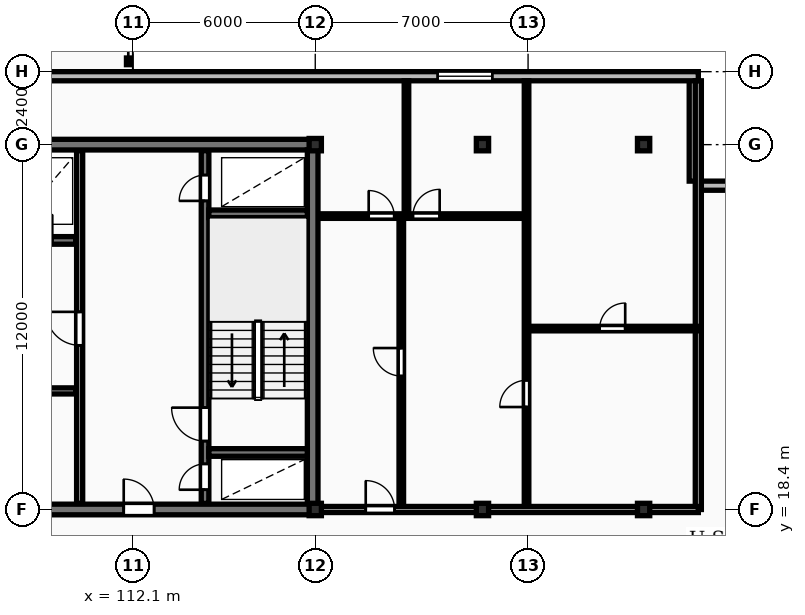
"""IFC4 building model, lengths in metres.
Left out: names, types, materials, properties, quantities, classifications, styles, units other than length and angle.
Written with IfcOpenShell. Run it as: python <this file> out.ifc"""

import sys

from ifc_helpers import new_model, si_unit, direction, frame, frame_2d, origin, origin_2d, place, context, subcontext, project, spatial, rectangle, i_section, extrude, element, fill, save


model = new_model("IFC4")
c1 = context("Model", 3, precision=1e-05, world=origin(), true_north=direction((0.0, 1.0)))
c2 = subcontext(c1, "Body", "Model", "MODEL_VIEW")
j1 = project(units=[si_unit("LENGTHUNIT", "METRE"), si_unit("PLANEANGLEUNIT", "RADIAN")], contexts=[c1])
p1 = place(None, origin())
s1 = spatial("IfcSite", under=j1, at=p1, CompositionType="ELEMENT")
p2 = place(p1, origin())
s2 = spatial("IfcBuilding", under=s1, at=p2, CompositionType="ELEMENT")
p3 = place(p2, frame((0.0, 0.0, 150.1)))
s3 = spatial("IfcBuildingStorey", under=s2, at=p3, CompositionType="ELEMENT", Elevation=150.1)
for number, where, z_axis, x_axis in (
    (1, (118.1, 18.4, 0.0), (0.0, 0.0, 1.0), (1.0, 0.0, 0.0)),
    (2, (118.1, 30.4, 0.0), (0.0, 0.0, 1.0), (1.0, 0.0, 0.0)),
    (3, (123.6, 18.4, 0.0), (0.0, 0.0, 1.0), (1.0, 0.0, 0.0)),
    (4, (123.6, 30.4, 0.0), (0.0, 0.0, 1.0), (1.0, 0.0, 0.0)),
    (5, (128.9, 18.4, 0.0), (0.0, 0.0, 1.0), (1.0, 0.0, 0.0)),
    (6, (128.9, 30.4, 0.0), (0.0, 0.0, 1.0), (1.0, 0.0, 0.0)),
):
    element("IfcColumn", number, at=place(p3, frame(where, z_axis=z_axis, x_axis=x_axis)), inside=s3, PredefinedType="COLUMN", context=c2, shape_type="SweptSolid", body=[
        extrude(i_section(OverallWidth=0.403, OverallDepth=0.406, WebThickness=0.027, FlangeThickness=0.043, FilletRadius=0.015, at=origin_2d()), origin(), (0.0, 0.0, 1.0), 3.6),
    ])
for number, where, z_axis, x_axis in (
    (7, (134.3, 29.05, 0.0), (0.0, 0.0, 1.0), (-1.0, 0.0, 0.0)),
    (8, (130.55, 29.2, 0.0), (0.0, 0.0, 1.0), (0.0, 1.0, 0.0)),
):
    element("IfcWall", number, at=place(p3, frame(where, z_axis=z_axis, x_axis=x_axis)), inside=s3, PredefinedType="STANDARD", context=c2, shape_type="SweptSolid", body=[
        extrude(rectangle(XDim=3.6, YDim=0.3, at=frame_2d((1.8, 0.0))), origin(), (0.0, 0.0, 1.0), 3.31),
    ])
p4 = place(p3, frame((130.7, 32.65, 0.0), z_axis=(0.0, 0.0, 1.0), x_axis=(-1.0, 0.0, 0.0)))
e9 = element("IfcWall", 9, at=p4, inside=s3, PredefinedType="STANDARD", context=c2, shape_type="SweptSolid", body=[
    extrude(rectangle(XDim=58.0, YDim=0.3, at=frame_2d((29.0, 0.0))), origin(), (0.0, 0.0, 1.0), 3.31),
])
p5 = place(p4, frame((50.125, 0.0, 0.85)))
e10 = element("IfcOpeningElement", 10, at=p5, cuts=e9, PredefinedType="OPENING", context=c2, shape_type="SweptSolid", body=[
    extrude(rectangle(XDim=1.8, YDim=1.8, at=frame_2d((0.9, 0.9))), frame((0.0, 0.16, 0.0), z_axis=(0.0, -1.0, 0.0), x_axis=(1.0, 0.0, 0.0)), (0.0, 0.0, 1.0), 0.32),
])
p6 = place(p4, frame((6.775, 0.0, 0.85)))
e11 = element("IfcOpeningElement", 11, at=p6, cuts=e9, PredefinedType="OPENING", context=c2, shape_type="SweptSolid", body=[
    extrude(rectangle(XDim=1.8, YDim=1.8, at=frame_2d((0.9, 0.9))), frame((0.0, 0.16, 0.0), z_axis=(0.0, -1.0, 0.0), x_axis=(1.0, 0.0, 0.0)), (0.0, 0.0, 1.0), 0.32),
])
p7 = place(p4, frame((38.0, 0.0, 0.0)))
e12 = element("IfcOpeningElement", 12, at=p7, cuts=e9, PredefinedType="OPENING", context=c2, shape_type="SweptSolid", body=[
    extrude(rectangle(XDim=1.1, YDim=2.1, at=frame_2d((0.55, 1.05))), frame((0.0, 0.16, 0.0), z_axis=(0.0, -1.0, 0.0), x_axis=(1.0, 0.0, 0.0)), (0.0, 0.0, 1.0), 0.32),
])
p8 = place(p3, frame((81.925, 30.4, 0.0), z_axis=(0.0, 0.0, 1.0), x_axis=(1.0, 0.0, 0.0)))
e13 = element("IfcWall", 13, at=p8, inside=s3, PredefinedType="SHEAR", context=c2, shape_type="SweptSolid", body=[
    extrude(rectangle(XDim=36.265, YDim=0.35, at=frame_2d((18.132, 0.0))), origin(), (0.0, 0.0, 1.0), 3.6),
])
p9 = place(p8, frame((9.675, 0.0, 0.0)))
e14 = element("IfcOpeningElement", 14, at=p9, cuts=e13, PredefinedType="OPENING", context=c2, shape_type="SweptSolid", body=[
    extrude(rectangle(XDim=1.1, YDim=2.1, at=frame_2d((0.55, 1.05))), frame((0.0, 0.185, 0.0), z_axis=(0.0, -1.0, 0.0), x_axis=(1.0, 0.0, 0.0)), (0.0, 0.0, 1.0), 0.37),
])
p10 = place(p3, frame((118.015, 18.575, 0.0), z_axis=(0.0, 0.0, 1.0), x_axis=(0.0, 1.0, 0.0)))
e15 = element("IfcWall", 15, at=p10, inside=s3, PredefinedType="SHEAR", context=c2, shape_type="SweptSolid", body=[
    extrude(rectangle(XDim=11.65, YDim=0.35, at=frame_2d((5.825, 0.0))), origin(), (0.0, 0.0, 1.0), 3.6),
])
p11 = place(p3, frame((81.925, 18.4, 0.0), z_axis=(0.0, 0.0, 1.0), x_axis=(1.0, 0.0, 0.0)))
e16 = element("IfcWall", 16, at=p11, inside=s3, PredefinedType="SHEAR", context=c2, shape_type="SweptSolid", body=[
    extrude(rectangle(XDim=36.265, YDim=0.35, at=frame_2d((18.132, 0.0))), origin(), (0.0, 0.0, 1.0), 3.6),
])
p12 = place(p11, frame((5.675, 0.0, 0.0)))
e17 = element("IfcOpeningElement", 17, at=p12, cuts=e16, PredefinedType="OPENING", context=c2, shape_type="SweptSolid", body=[
    extrude(rectangle(XDim=1.0, YDim=2.15, at=frame_2d((0.5, 1.075))), frame((0.0, 0.185, 0.0), z_axis=(0.0, -1.0, 0.0), x_axis=(1.0, 0.0, 0.0)), (0.0, 0.0, 1.0), 0.37),
])
p13 = place(p11, frame((21.925, 0.0, 0.0)))
e18 = element("IfcOpeningElement", 18, at=p13, cuts=e16, PredefinedType="OPENING", context=c2, shape_type="SweptSolid", body=[
    extrude(rectangle(XDim=1.5, YDim=2.2, at=frame_2d((0.75, 1.1))), frame((0.0, 0.185, 0.0), z_axis=(0.0, -1.0, 0.0), x_axis=(1.0, 0.0, 0.0)), (0.0, 0.0, 1.0), 0.37),
])
p14 = place(p11, frame((29.875, 0.0, 0.0)))
e19 = element("IfcOpeningElement", 19, at=p14, cuts=e16, PredefinedType="OPENING", context=c2, shape_type="SweptSolid", body=[
    extrude(rectangle(XDim=1.0, YDim=2.15, at=frame_2d((0.5, 1.075))), frame((0.0, 0.185, 0.0), z_axis=(0.0, -1.0, 0.0), x_axis=(1.0, 0.0, 0.0)), (0.0, 0.0, 1.0), 0.37),
])
p15 = place(p3, frame((99.68, 27.25, 0.0), z_axis=(0.0, 0.0, 1.0), x_axis=(1.0, 0.0, 0.0)))
e20 = element("IfcWall", 20, at=p15, inside=s3, PredefinedType="SHEAR", context=c2, shape_type="SweptSolid", body=[
    extrude(rectangle(XDim=10.54, YDim=0.25, at=frame_2d((5.27, 0.0))), origin(), (0.0, 0.0, 1.0), 3.6),
])
p16 = place(p15, frame((0.76, 0.0, 0.0)))
e21 = element("IfcOpeningElement", 21, at=p16, cuts=e20, PredefinedType="OPENING", context=c2, shape_type="SweptSolid", body=[
    extrude(rectangle(XDim=1.12, YDim=2.12, at=frame_2d((0.56, 1.06))), frame((0.0, 0.135, 0.0), z_axis=(0.0, -1.0, 0.0), x_axis=(1.0, 0.0, 0.0)), (0.0, 0.0, 1.0), 0.27),
])
p17 = place(p15, frame((3.56, 0.0, 0.0)))
e22 = element("IfcOpeningElement", 22, at=p17, cuts=e20, PredefinedType="OPENING", context=c2, shape_type="SweptSolid", body=[
    extrude(rectangle(XDim=1.12, YDim=2.12, at=frame_2d((0.56, 1.06))), frame((0.0, 0.135, 0.0), z_axis=(0.0, -1.0, 0.0), x_axis=(1.0, 0.0, 0.0)), (0.0, 0.0, 1.0), 0.27),
])
p18 = place(p15, frame((6.36, 0.0, 0.0)))
e23 = element("IfcOpeningElement", 23, at=p18, cuts=e20, PredefinedType="OPENING", context=c2, shape_type="SweptSolid", body=[
    extrude(rectangle(XDim=1.12, YDim=2.12, at=frame_2d((0.56, 1.06))), frame((0.0, 0.135, 0.0), z_axis=(0.0, -1.0, 0.0), x_axis=(1.0, 0.0, 0.0)), (0.0, 0.0, 1.0), 0.27),
])
p19 = place(p15, frame((8.92, 0.0, 0.0)))
e24 = element("IfcOpeningElement", 24, at=p19, cuts=e20, PredefinedType="OPENING", context=c2, shape_type="SweptSolid", body=[
    extrude(rectangle(XDim=0.85, YDim=2.05, at=frame_2d((0.425, 1.025))), frame((0.0, 0.135, 0.0), z_axis=(0.0, -1.0, 0.0), x_axis=(1.0, 0.0, 0.0)), (0.0, 0.0, 1.0), 0.27),
])
p20 = place(p3, frame((91.08, 22.3, 0.0), z_axis=(0.0, 0.0, 1.0), x_axis=(1.0, 0.0, 0.0)))
e25 = element("IfcWall", 25, at=p20, inside=s3, PredefinedType="PARTITIONING", context=c2, shape_type="SweptSolid", body=[
    extrude(rectangle(XDim=19.14, YDim=0.2, at=frame_2d((9.57, 0.0))), origin(), (0.0, 0.0, 1.0), 3.31),
])
p21 = place(p20, frame((1.15, 0.0, 0.0)))
e26 = element("IfcOpeningElement", 26, at=p21, cuts=e25, PredefinedType="OPENING", context=c2, shape_type="SweptSolid", body=[
    extrude(rectangle(XDim=0.85, YDim=2.05, at=frame_2d((0.425, 1.025))), frame((0.0, 0.11, 0.0), z_axis=(0.0, -1.0, 0.0), x_axis=(1.0, 0.0, 0.0)), (0.0, 0.0, 1.0), 0.22),
])
p22 = place(p20, frame((3.2, 0.0, 0.0)))
e27 = element("IfcOpeningElement", 27, at=p22, cuts=e25, PredefinedType="OPENING", context=c2, shape_type="SweptSolid", body=[
    extrude(rectangle(XDim=0.85, YDim=2.05, at=frame_2d((0.425, 1.025))), frame((0.0, 0.11, 0.0), z_axis=(0.0, -1.0, 0.0), x_axis=(1.0, 0.0, 0.0)), (0.0, 0.0, 1.0), 0.22),
])
p23 = place(p20, frame((12.72, 0.0, 0.0)))
e28 = element("IfcOpeningElement", 28, at=p23, cuts=e25, PredefinedType="OPENING", context=c2, shape_type="SweptSolid", body=[
    extrude(rectangle(XDim=1.5, YDim=2.2, at=frame_2d((0.75, 1.1))), frame((0.0, 0.11, 0.0), z_axis=(0.0, -1.0, 0.0), x_axis=(1.0, 0.0, 0.0)), (0.0, 0.0, 1.0), 0.22),
])
p24 = place(p20, frame((6.42, 0.0, 0.0)))
e29 = element("IfcOpeningElement", 29, at=p24, cuts=e25, PredefinedType="OPENING", context=c2, shape_type="SweptSolid", body=[
    extrude(rectangle(XDim=0.92, YDim=2.08, at=frame_2d((0.46, 1.04))), frame((0.0, 0.11, 0.0), z_axis=(0.0, -1.0, 0.0), x_axis=(1.0, 0.0, 0.0)), (0.0, 0.0, 1.0), 0.22),
])
p25 = place(p20, frame((15.92, 0.0, 0.0)))
e30 = element("IfcOpeningElement", 30, at=p25, cuts=e25, PredefinedType="OPENING", context=c2, shape_type="SweptSolid", body=[
    extrude(rectangle(XDim=0.88, YDim=2.06, at=frame_2d((0.44, 1.03))), frame((0.0, 0.11, 0.0), z_axis=(0.0, -1.0, 0.0), x_axis=(1.0, 0.0, 0.0)), (0.0, 0.0, 1.0), 0.22),
])
p26 = place(p3, frame((110.35, 18.6, 0.0), z_axis=(0.0, 0.0, 1.0), x_axis=(0.0, 1.0, 0.0)))
e31 = element("IfcWall", 31, at=p26, inside=s3, PredefinedType="PARTITIONING", context=c2, shape_type="SweptSolid", body=[
    extrude(rectangle(XDim=11.6, YDim=0.2, at=frame_2d((5.8, 0.0))), origin(), (0.0, 0.0, 1.0), 3.31),
])
p27 = place(p26, frame((5.2, 0.0, 0.0)))
e32 = element("IfcOpeningElement", 32, at=p27, cuts=e31, PredefinedType="OPENING", context=c2, shape_type="SweptSolid", body=[
    extrude(rectangle(XDim=1.1, YDim=2.15, at=frame_2d((0.55, 1.075))), frame((0.0, 0.11, 0.0), z_axis=(0.0, -1.0, 0.0), x_axis=(1.0, 0.0, 0.0)), (0.0, 0.0, 1.0), 0.22),
])
p28 = place(p3, frame((114.475, 18.6, 0.0), z_axis=(0.0, 0.0, 1.0), x_axis=(0.0, 1.0, 0.0)))
e33 = element("IfcWall", 33, at=p28, inside=s3, PredefinedType="SHEAR", context=c2, shape_type="SweptSolid", body=[
    extrude(rectangle(XDim=11.6, YDim=0.25, at=frame_2d((5.8, 0.0))), origin(), (0.0, 0.0, 1.0), 3.6),
])
p29 = place(p28, frame((0.45, 0.0, 0.0)))
e34 = element("IfcOpeningElement", 34, at=p29, cuts=e33, PredefinedType="OPENING", context=c2, shape_type="SweptSolid", body=[
    extrude(rectangle(XDim=0.85, YDim=2.05, at=frame_2d((0.425, 1.025))), frame((0.0, 0.135, 0.0), z_axis=(0.0, -1.0, 0.0), x_axis=(1.0, 0.0, 0.0)), (0.0, 0.0, 1.0), 0.27),
])
p30 = place(p28, frame((2.05, 0.0, 0.0)))
e35 = element("IfcOpeningElement", 35, at=p30, cuts=e33, PredefinedType="OPENING", context=c2, shape_type="SweptSolid", body=[
    extrude(rectangle(XDim=1.1, YDim=2.1, at=frame_2d((0.55, 1.05))), frame((0.0, 0.135, 0.0), z_axis=(0.0, -1.0, 0.0), x_axis=(1.0, 0.0, 0.0)), (0.0, 0.0, 1.0), 0.27),
])
p31 = place(p28, frame((9.95, 0.0, 0.0)))
e36 = element("IfcOpeningElement", 36, at=p31, cuts=e33, PredefinedType="OPENING", context=c2, shape_type="SweptSolid", body=[
    extrude(rectangle(XDim=0.85, YDim=2.05, at=frame_2d((0.425, 1.025))), frame((0.0, 0.135, 0.0), z_axis=(0.0, -1.0, 0.0), x_axis=(1.0, 0.0, 0.0)), (0.0, 0.0, 1.0), 0.27),
])
for number, where, z_axis, x_axis in (
    (37, (114.6, 20.275, 0.0), (0.0, 0.0, 1.0), (1.0, 0.0, 0.0)),
    (38, (114.6, 28.125, 0.0), (0.0, 0.0, 1.0), (1.0, 0.0, 0.0)),
):
    element("IfcWall", number, at=place(p3, frame(where, z_axis=z_axis, x_axis=x_axis)), inside=s3, PredefinedType="SHEAR", context=c2, shape_type="SweptSolid", body=[
        extrude(rectangle(XDim=3.24, YDim=0.25, at=frame_2d((1.62, 0.0))), origin(), (0.0, 0.0, 1.0), 3.6),
    ])
p32 = place(p3, frame((130.7, 18.4, 0.0), z_axis=(0.0, 0.0, 1.0), x_axis=(0.0, 1.0, 0.0)))
e39 = element("IfcWall", 39, at=p32, inside=s3, PredefinedType="PARTITIONING", context=c2, shape_type="SweptSolid", body=[
    extrude(rectangle(XDim=14.1, YDim=0.2, at=frame_2d((7.05, 0.0))), origin(), (0.0, 0.0, 1.0), 3.31),
])
p33 = place(p3, frame((125.05, 24.35, 0.0), z_axis=(0.0, 0.0, 1.0), x_axis=(1.0, 0.0, 0.0)))
e40 = element("IfcWall", 40, at=p33, inside=s3, PredefinedType="PARTITIONING", context=c2, shape_type="SweptSolid", body=[
    extrude(rectangle(XDim=5.65, YDim=0.15, at=frame_2d((2.825, 0.0))), origin(), (0.0, 0.0, 1.0), 3.31),
])
p34 = place(p33, frame((2.405, 0.0, 0.0)))
e41 = element("IfcOpeningElement", 41, at=p34, cuts=e40, PredefinedType="OPENING", context=c2, shape_type="SweptSolid", body=[
    extrude(rectangle(XDim=0.84, YDim=2.04, at=frame_2d((0.42, 1.02))), frame((0.0, 0.085, 0.0), z_axis=(0.0, -1.0, 0.0), x_axis=(1.0, 0.0, 0.0)), (0.0, 0.0, 1.0), 0.17),
])
p35 = place(p3, frame((125.05, 18.45, 0.0), z_axis=(0.0, 0.0, 1.0), x_axis=(0.0, 1.0, 0.0)))
e42 = element("IfcWall", 42, at=p35, inside=s3, PredefinedType="PARTITIONING", context=c2, shape_type="SweptSolid", body=[
    extrude(rectangle(XDim=14.05, YDim=0.15, at=frame_2d((7.025, 0.0))), origin(), (0.0, 0.0, 1.0), 3.31),
])
p36 = place(p35, frame((3.32, 0.0, 0.0)))
e43 = element("IfcOpeningElement", 43, at=p36, cuts=e42, PredefinedType="OPENING", context=c2, shape_type="SweptSolid", body=[
    extrude(rectangle(XDim=0.88, YDim=2.06, at=frame_2d((0.44, 1.03))), frame((0.0, 0.085, 0.0), z_axis=(0.0, -1.0, 0.0), x_axis=(1.0, 0.0, 0.0)), (0.0, 0.0, 1.0), 0.17),
])
p37 = place(p3, frame((120.93, 18.45, 0.0), z_axis=(0.0, 0.0, 1.0), x_axis=(0.0, 1.0, 0.0)))
e44 = element("IfcWall", 44, at=p37, inside=s3, PredefinedType="PARTITIONING", context=c2, shape_type="SweptSolid", body=[
    extrude(rectangle(XDim=9.6, YDim=0.15, at=frame_2d((4.8, 0.0))), origin(), (0.0, 0.0, 1.0), 3.31),
])
p38 = place(p37, frame((4.34, 0.0, 0.0)))
e45 = element("IfcOpeningElement", 45, at=p38, cuts=e44, PredefinedType="OPENING", context=c2, shape_type="SweptSolid", body=[
    extrude(rectangle(XDim=0.92, YDim=2.08, at=frame_2d((0.46, 1.04))), frame((0.0, 0.085, 0.0), z_axis=(0.0, -1.0, 0.0), x_axis=(1.0, 0.0, 0.0)), (0.0, 0.0, 1.0), 0.17),
])
p39 = place(p3, frame((121.1, 28.05, 0.0), z_axis=(0.0, 0.0, 1.0), x_axis=(0.0, 1.0, 0.0)))
e46 = element("IfcWall", 46, at=p39, inside=s3, PredefinedType="PARTITIONING", context=c2, shape_type="SweptSolid", body=[
    extrude(rectangle(XDim=4.45, YDim=0.15, at=frame_2d((2.225, 0.0))), origin(), (0.0, 0.0, 1.0), 3.31),
])
p40 = place(p3, frame((118.27, 28.05, 0.0), z_axis=(0.0, 0.0, 1.0), x_axis=(1.0, 0.0, 0.0)))
e47 = element("IfcWall", 47, at=p40, inside=s3, PredefinedType="PARTITIONING", context=c2, shape_type="SweptSolid", body=[
    extrude(rectangle(XDim=6.76, YDim=0.15, at=frame_2d((3.38, 0.0))), origin(), (0.0, 0.0, 1.0), 3.31),
])
p41 = place(p40, frame((1.587, 0.0, 0.0)))
e48 = element("IfcOpeningElement", 48, at=p41, cuts=e47, PredefinedType="OPENING", context=c2, shape_type="SweptSolid", body=[
    extrude(rectangle(XDim=0.84, YDim=2.04, at=frame_2d((0.42, 1.02))), frame((0.0, 0.085, 0.0), z_axis=(0.0, -1.0, 0.0), x_axis=(1.0, 0.0, 0.0)), (0.0, 0.0, 1.0), 0.17),
])
p42 = place(p40, frame((3.042, 0.0, 0.0)))
e49 = element("IfcOpeningElement", 49, at=p42, cuts=e47, PredefinedType="OPENING", context=c2, shape_type="SweptSolid", body=[
    extrude(rectangle(XDim=0.88, YDim=2.06, at=frame_2d((0.44, 1.03))), frame((0.0, 0.085, 0.0), z_axis=(0.0, -1.0, 0.0), x_axis=(1.0, 0.0, 0.0)), (0.0, 0.0, 1.0), 0.17),
])
p43 = place(p3, frame((118.25, 18.4, 0.0), z_axis=(0.0, 0.0, 1.0), x_axis=(1.0, 0.0, 0.0)))
e50 = element("IfcWall", 50, at=p43, inside=s3, PredefinedType="PARTITIONING", context=c2, shape_type="SweptSolid", body=[
    extrude(rectangle(XDim=12.45, YDim=0.2, at=frame_2d((6.225, 0.0))), origin(), (0.0, 0.0, 1.0), 2.698),
])
p44 = place(p43, frame((1.51, 0.0, 0.0)))
e51 = element("IfcOpeningElement", 51, at=p44, cuts=e50, PredefinedType="OPENING", context=c2, shape_type="SweptSolid", body=[
    extrude(rectangle(XDim=0.95, YDim=2.15, at=frame_2d((0.475, 1.075))), frame((0.0, 0.11, 0.0), z_axis=(0.0, -1.0, 0.0), x_axis=(1.0, 0.0, 0.0)), (0.0, 0.0, 1.0), 0.22),
])
p45 = place(p6, origin())
e52 = element("IfcWindow", 52, at=p45, inside=s3, PartitioningType="SINGLE_PANEL", PredefinedType="WINDOW", context=c2, shape_type="SweptSolid", body=[
    extrude(rectangle(XDim=1.8, YDim=1.8, at=frame_2d((0.9, 0.9))), frame((0.0, 0.03, 0.0), z_axis=(0.0, -1.0, 0.0), x_axis=(1.0, 0.0, 0.0)), (0.0, 0.0, 1.0), 0.06),
])
fill(e11, e52)
p46 = place(p14, origin())
e53 = element("IfcDoor", 53, at=p46, inside=s3, OperationType="SINGLE_SWING_LEFT", PredefinedType="DOOR", context=c2, shape_type="SweptSolid", body=[
    extrude(rectangle(XDim=1.0, YDim=2.15, at=frame_2d((0.5, 1.075))), frame((0.0, 0.025, 0.0), z_axis=(0.0, -1.0, 0.0), x_axis=(1.0, 0.0, 0.0)), (0.0, 0.0, 1.0), 0.05),
])
fill(e19, e53)
p47 = place(p27, origin())
e54 = element("IfcDoor", 54, at=p47, inside=s3, OperationType="SINGLE_SWING_RIGHT", PredefinedType="DOOR", context=c2, shape_type="SweptSolid", body=[
    extrude(rectangle(XDim=1.1, YDim=2.15, at=frame_2d((0.55, 1.075))), frame((0.0, 0.025, 0.0), z_axis=(0.0, -1.0, 0.0), x_axis=(1.0, 0.0, 0.0)), (0.0, 0.0, 1.0), 0.05),
])
fill(e32, e54)
p48 = place(p29, origin())
e55 = element("IfcDoor", 55, at=p48, inside=s3, OperationType="SINGLE_SWING_LEFT", PredefinedType="DOOR", context=c2, shape_type="SweptSolid", body=[
    extrude(rectangle(XDim=0.85, YDim=2.05, at=frame_2d((0.425, 1.025))), frame((0.0, 0.025, 0.0), z_axis=(0.0, -1.0, 0.0), x_axis=(1.0, 0.0, 0.0)), (0.0, 0.0, 1.0), 0.05),
])
fill(e34, e55)
p49 = place(p30, origin())
e56 = element("IfcDoor", 56, at=p49, inside=s3, OperationType="SINGLE_SWING_RIGHT", PredefinedType="DOOR", context=c2, shape_type="SweptSolid", body=[
    extrude(rectangle(XDim=1.1, YDim=2.1, at=frame_2d((0.55, 1.05))), frame((0.0, 0.025, 0.0), z_axis=(0.0, -1.0, 0.0), x_axis=(1.0, 0.0, 0.0)), (0.0, 0.0, 1.0), 0.05),
])
fill(e35, e56)
p50 = place(p31, origin())
e57 = element("IfcDoor", 57, at=p50, inside=s3, OperationType="SINGLE_SWING_LEFT", PredefinedType="DOOR", context=c2, shape_type="SweptSolid", body=[
    extrude(rectangle(XDim=0.85, YDim=2.05, at=frame_2d((0.425, 1.025))), frame((0.0, 0.025, 0.0), z_axis=(0.0, -1.0, 0.0), x_axis=(1.0, 0.0, 0.0)), (0.0, 0.0, 1.0), 0.05),
])
fill(e36, e57)
p51 = place(p34, origin())
e58 = element("IfcDoor", 58, at=p51, inside=s3, OperationType="SINGLE_SWING_RIGHT", PredefinedType="DOOR", context=c2, shape_type="SweptSolid", body=[
    extrude(rectangle(XDim=0.84, YDim=2.04, at=frame_2d((0.42, 1.02))), frame((0.0, 0.025, 0.0), z_axis=(0.0, -1.0, 0.0), x_axis=(1.0, 0.0, 0.0)), (0.0, 0.0, 1.0), 0.05),
])
fill(e41, e58)
p52 = place(p36, origin())
e59 = element("IfcDoor", 59, at=p52, inside=s3, OperationType="SINGLE_SWING_LEFT", PredefinedType="DOOR", context=c2, shape_type="SweptSolid", body=[
    extrude(rectangle(XDim=0.88, YDim=2.06, at=frame_2d((0.44, 1.03))), frame((0.0, 0.025, 0.0), z_axis=(0.0, -1.0, 0.0), x_axis=(1.0, 0.0, 0.0)), (0.0, 0.0, 1.0), 0.05),
])
fill(e43, e59)
p53 = place(p38, origin())
e60 = element("IfcDoor", 60, at=p53, inside=s3, OperationType="SINGLE_SWING_RIGHT", PredefinedType="DOOR", context=c2, shape_type="SweptSolid", body=[
    extrude(rectangle(XDim=0.92, YDim=2.08, at=frame_2d((0.46, 1.04))), frame((0.0, 0.025, 0.0), z_axis=(0.0, -1.0, 0.0), x_axis=(1.0, 0.0, 0.0)), (0.0, 0.0, 1.0), 0.05),
])
fill(e45, e60)
p54 = place(p41, origin())
e61 = element("IfcDoor", 61, at=p54, inside=s3, OperationType="SINGLE_SWING_LEFT", PredefinedType="DOOR", context=c2, shape_type="SweptSolid", body=[
    extrude(rectangle(XDim=0.84, YDim=2.04, at=frame_2d((0.42, 1.02))), frame((0.0, 0.025, 0.0), z_axis=(0.0, -1.0, 0.0), x_axis=(1.0, 0.0, 0.0)), (0.0, 0.0, 1.0), 0.05),
])
fill(e48, e61)
p55 = place(p42, origin())
e62 = element("IfcDoor", 62, at=p55, inside=s3, OperationType="SINGLE_SWING_RIGHT", PredefinedType="DOOR", context=c2, shape_type="SweptSolid", body=[
    extrude(rectangle(XDim=0.88, YDim=2.06, at=frame_2d((0.44, 1.03))), frame((0.0, 0.025, 0.0), z_axis=(0.0, -1.0, 0.0), x_axis=(1.0, 0.0, 0.0)), (0.0, 0.0, 1.0), 0.05),
])
fill(e49, e62)
p56 = place(p44, origin())
e63 = element("IfcDoor", 63, at=p56, inside=s3, OperationType="SINGLE_SWING_LEFT", PredefinedType="DOOR", context=c2, shape_type="SweptSolid", body=[
    extrude(rectangle(XDim=0.95, YDim=2.15, at=frame_2d((0.475, 1.075))), frame((0.0, 0.025, 0.0), z_axis=(0.0, -1.0, 0.0), x_axis=(1.0, 0.0, 0.0)), (0.0, 0.0, 1.0), 0.05),
])
fill(e51, e63)
save(model, sys.argv[1])
